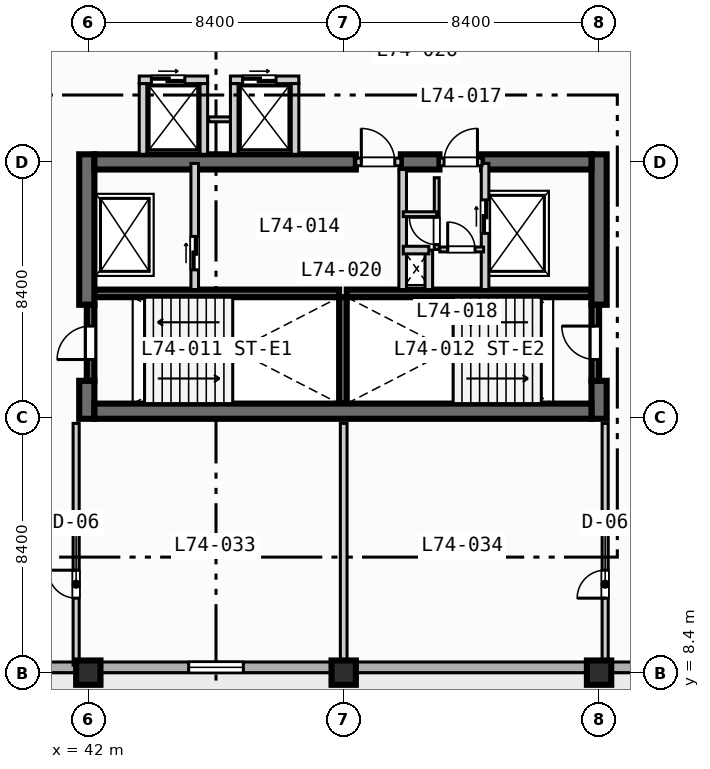
"""IFC4 building model, lengths in metres.
Left out: names, types, materials, properties, quantities, classifications, styles, units other than length and angle.
Written with IfcOpenShell. Run it as: python <this file> out.ifc"""

import sys

from ifc_helpers import new_model, si_unit, direction, frame, frame_2d, origin, origin_2d, place, context, subcontext, project, spatial, rectangle, extrude, element, fill, save


model = new_model("IFC4")
c1 = context("Model", 3, precision=1e-05, world=origin(), true_north=direction((0.0, 1.0)))
c2 = subcontext(c1, "Body", "Model", "MODEL_VIEW")
j1 = project(units=[si_unit("LENGTHUNIT", "METRE"), si_unit("PLANEANGLEUNIT", "RADIAN")], contexts=[c1])
p1 = place(None, origin())
s1 = spatial("IfcSite", under=j1, at=p1, CompositionType="ELEMENT")
p2 = place(p1, origin())
s2 = spatial("IfcBuilding", under=s1, at=p2, CompositionType="ELEMENT")
p3 = place(p2, frame((0.0, 0.0, 300.8)))
s3 = spatial("IfcBuildingStorey", under=s2, at=p3, CompositionType="ELEMENT", Elevation=300.8)
for number, where, z_axis, x_axis in (
    (1, (42.2, 20.875, 0.0), (0.0, 0.0, 1.0), (1.0, 0.0, 0.0)),
    (2, (50.5, 20.875, 0.0), (0.0, 0.0, 1.0), (1.0, 0.0, 0.0)),
):
    element("IfcWall", number, at=place(p3, frame(where, z_axis=z_axis, x_axis=x_axis)), inside=s3, PredefinedType="SOLIDWALL", context=c2, shape_type="SweptSolid", body=[
        extrude(rectangle(XDim=8.05, YDim=0.25, at=frame_2d((4.025, 0.0))), origin(), (0.0, 0.0, 1.0), 3.67),
    ])
p4 = place(p3, frame((50.375, 17.25, 0.0), z_axis=(0.0, 0.0, 1.0), x_axis=(0.0, 1.0, 0.0)))
e3 = element("IfcWall", 3, at=p4, inside=s3, PredefinedType="SOLIDWALL", context=c2, shape_type="SweptSolid", body=[
    extrude(rectangle(XDim=3.5, YDim=0.25, at=frame_2d((1.75, 0.0))), origin(), (0.0, 0.0, 1.0), 3.67),
])
p5 = place(p3, frame((41.95, 16.75, 0.0), z_axis=(0.0, 0.0, 1.0), x_axis=(0.0, 1.0, 0.0)))
e4 = element("IfcWall", 4, at=p5, inside=s3, PredefinedType="SHEAR", context=c2, shape_type="SweptSolid", body=[
    extrude(rectangle(XDim=1.25, YDim=0.5, at=frame_2d((0.625, 0.0))), origin(), (0.0, 0.0, 1.0), 3.67),
])
p6 = place(p3, frame((41.95, 20.5, 0.0), z_axis=(0.0, 0.0, 1.0), x_axis=(0.0, 1.0, 0.0)))
e5 = element("IfcWall", 5, at=p6, inside=s3, PredefinedType="SHEAR", context=c2, shape_type="SweptSolid", body=[
    extrude(rectangle(XDim=4.95, YDim=0.5, at=frame_2d((2.475, 0.0))), origin(), (0.0, 0.0, 1.0), 3.67),
])
p7 = place(p3, frame((58.8, 16.75, 0.0), z_axis=(0.0, 0.0, 1.0), x_axis=(0.0, 1.0, 0.0)))
e6 = element("IfcWall", 6, at=p7, inside=s3, PredefinedType="SHEAR", context=c2, shape_type="SweptSolid", body=[
    extrude(rectangle(XDim=1.25, YDim=0.5, at=frame_2d((0.625, 0.0))), origin(), (0.0, 0.0, 1.0), 3.67),
])
p8 = place(p3, frame((58.8, 20.5, 0.0), z_axis=(0.0, 0.0, 1.0), x_axis=(0.0, 1.0, 0.0)))
e7 = element("IfcWall", 7, at=p8, inside=s3, PredefinedType="SHEAR", context=c2, shape_type="SweptSolid", body=[
    extrude(rectangle(XDim=4.95, YDim=0.5, at=frame_2d((2.475, 0.0))), origin(), (0.0, 0.0, 1.0), 3.67),
])
p9 = place(p3, frame((42.2, 17.0, 0.0), z_axis=(0.0, 0.0, 1.0), x_axis=(1.0, 0.0, 0.0)))
e8 = element("IfcWall", 8, at=p9, inside=s3, PredefinedType="SHEAR", context=c2, shape_type="SweptSolid", body=[
    extrude(rectangle(XDim=16.35, YDim=0.5, at=frame_2d((8.175, 0.0))), origin(), (0.0, 0.0, 1.0), 3.67),
])
p10 = place(p3, frame((42.2, 25.2, 0.0), z_axis=(0.0, 0.0, 1.0), x_axis=(1.0, 0.0, 0.0)))
e9 = element("IfcWall", 9, at=p10, inside=s3, PredefinedType="SHEAR", context=c2, shape_type="SweptSolid", body=[
    extrude(rectangle(XDim=8.6, YDim=0.5, at=frame_2d((4.3, 0.0))), origin(), (0.0, 0.0, 1.0), 3.67),
])
p11 = place(p3, frame((52.28, 25.2, 0.0), z_axis=(0.0, 0.0, 1.0), x_axis=(1.0, 0.0, 0.0)))
e10 = element("IfcWall", 10, at=p11, inside=s3, PredefinedType="SHEAR", context=c2, shape_type="SweptSolid", body=[
    extrude(rectangle(XDim=1.27, YDim=0.5, at=frame_2d((0.635, 0.0))), origin(), (0.0, 0.0, 1.0), 3.67),
])
p12 = place(p3, frame((54.95, 25.2, 0.0), z_axis=(0.0, 0.0, 1.0), x_axis=(1.0, 0.0, 0.0)))
e11 = element("IfcWall", 11, at=p12, inside=s3, PredefinedType="SHEAR", context=c2, shape_type="SweptSolid", body=[
    extrude(rectangle(XDim=3.6, YDim=0.5, at=frame_2d((1.8, 0.0))), origin(), (0.0, 0.0, 1.0), 3.67),
])
for number, where, z_axis, x_axis in (
    (12, (42.0, 8.4, 0.0), (0.0, 0.0, 1.0), (1.0, 0.0, 0.0)),
    (13, (50.4, 8.4, 0.0), (0.0, 0.0, 1.0), (1.0, 0.0, 0.0)),
    (14, (58.8, 8.4, 0.0), (0.0, 0.0, 1.0), (1.0, 0.0, 0.0)),
):
    element("IfcColumn", number, at=place(p3, frame(where, z_axis=z_axis, x_axis=x_axis)), inside=s3, PredefinedType="COLUMN", context=c2, shape_type="SweptSolid", body=[
        extrude(rectangle(XDim=0.8, YDim=0.8, at=origin_2d()), origin(), (0.0, 0.0, 1.0), 3.9),
    ])
p13 = place(p3, frame((64.025, 8.575, 0.0), z_axis=(0.0, 0.0, 1.0), x_axis=(-1.0, 0.0, 0.0)))
e15 = element("IfcWall", 15, at=p13, inside=s3, PredefinedType="STANDARD", context=c2, shape_type="SweptSolid", body=[
    extrude(rectangle(XDim=52.45, YDim=0.35, at=frame_2d((26.225, 0.0))), origin(), (0.0, 0.0, 1.0), 3.67),
])
p14 = place(p13, frame((34.925, 0.0, 0.0)))
e16 = element("IfcOpeningElement", 16, at=p14, cuts=e15, PredefinedType="OPENING", context=c2, shape_type="SweptSolid", body=[
    extrude(rectangle(XDim=1.4, YDim=2.2, at=frame_2d((0.7, 1.1))), frame((0.0, 0.185, 0.0), z_axis=(0.0, -1.0, 0.0), x_axis=(1.0, 0.0, 0.0)), (0.0, 0.0, 1.0), 0.37),
])
p15 = place(p13, frame((25.025, 0.0, 0.85)))
e17 = element("IfcOpeningElement", 17, at=p15, cuts=e15, PredefinedType="OPENING", context=c2, shape_type="SweptSolid", body=[
    extrude(rectangle(XDim=2.4, YDim=1.95, at=frame_2d((1.2, 0.975))), frame((0.0, 0.185, 0.0), z_axis=(0.0, -1.0, 0.0), x_axis=(1.0, 0.0, 0.0)), (0.0, 0.0, 1.0), 0.37),
])
p16 = place(p13, frame((16.925, 0.0, 0.85)))
e18 = element("IfcOpeningElement", 18, at=p16, cuts=e15, PredefinedType="OPENING", context=c2, shape_type="SweptSolid", body=[
    extrude(rectangle(XDim=1.8, YDim=1.8, at=frame_2d((0.9, 0.9))), frame((0.0, 0.185, 0.0), z_axis=(0.0, -1.0, 0.0), x_axis=(1.0, 0.0, 0.0)), (0.0, 0.0, 1.0), 0.37),
])
p17 = place(p13, frame((47.925, 0.0, 0.85)))
e19 = element("IfcOpeningElement", 19, at=p17, cuts=e15, PredefinedType="OPENING", context=c2, shape_type="SweptSolid", body=[
    extrude(rectangle(XDim=1.8, YDim=1.8, at=frame_2d((0.9, 0.9))), frame((0.0, 0.185, 0.0), z_axis=(0.0, -1.0, 0.0), x_axis=(1.0, 0.0, 0.0)), (0.0, 0.0, 1.0), 0.37),
])
p18 = place(p3, frame((42.075, 18.0, 0.0), z_axis=(0.0, 0.0, 1.0), x_axis=(0.0, 1.0, 0.0)))
e20 = element("IfcWall", 20, at=p18, inside=s3, PredefinedType="SOLIDWALL", context=c2, shape_type="SweptSolid", body=[
    extrude(rectangle(XDim=2.5, YDim=0.25, at=frame_2d((1.25, 0.0))), origin(), (0.0, 0.0, 1.0), 3.67),
])
p19 = place(p18, frame((0.7, 0.0, 0.0)))
e21 = element("IfcOpeningElement", 21, at=p19, cuts=e20, PredefinedType="OPENING", context=c2, shape_type="SweptSolid", body=[
    extrude(rectangle(XDim=1.1, YDim=2.15, at=frame_2d((0.55, 1.075))), frame((0.0, 0.135, 0.0), z_axis=(0.0, -1.0, 0.0), x_axis=(1.0, 0.0, 0.0)), (0.0, 0.0, 1.0), 0.27),
])
p20 = place(p3, frame((58.675, 18.0, 0.0), z_axis=(0.0, 0.0, 1.0), x_axis=(0.0, 1.0, 0.0)))
e22 = element("IfcWall", 22, at=p20, inside=s3, PredefinedType="SOLIDWALL", context=c2, shape_type="SweptSolid", body=[
    extrude(rectangle(XDim=2.5, YDim=0.25, at=frame_2d((1.25, 0.0))), origin(), (0.0, 0.0, 1.0), 3.67),
])
p21 = place(p20, frame((0.7, 0.0, 0.0)))
e23 = element("IfcOpeningElement", 23, at=p21, cuts=e22, PredefinedType="OPENING", context=c2, shape_type="SweptSolid", body=[
    extrude(rectangle(XDim=1.1, YDim=2.15, at=frame_2d((0.55, 1.075))), frame((0.0, 0.135, 0.0), z_axis=(0.0, -1.0, 0.0), x_axis=(1.0, 0.0, 0.0)), (0.0, 0.0, 1.0), 0.27),
])
p22 = place(p3, frame((45.5, 21.0, 0.0), z_axis=(0.0, 0.0, 1.0), x_axis=(0.0, 1.0, 0.0)))
e24 = element("IfcWall", 24, at=p22, inside=s3, PredefinedType="SOLIDWALL", context=c2, shape_type="SweptSolid", body=[
    extrude(rectangle(XDim=4.15, YDim=0.25, at=frame_2d((2.075, 0.0))), origin(), (0.0, 0.0, 1.0), 3.67),
])
p23 = place(p22, frame((0.65, 0.0, 0.0)))
e25 = element("IfcOpeningElement", 25, at=p23, cuts=e24, PredefinedType="OPENING", context=c2, shape_type="SweptSolid", body=[
    extrude(rectangle(XDim=1.1, YDim=2.15, at=frame_2d((0.55, 1.075))), frame((0.0, 0.135, 0.0), z_axis=(0.0, -1.0, 0.0), x_axis=(1.0, 0.0, 0.0)), (0.0, 0.0, 1.0), 0.27),
])
p24 = place(p3, frame((50.8, 25.2, 0.0), z_axis=(0.0, 0.0, 1.0), x_axis=(1.0, 0.0, 0.0)))
e26 = element("IfcWall", 26, at=p24, inside=s3, PredefinedType="SOLIDWALL", context=c2, shape_type="SweptSolid", body=[
    extrude(rectangle(XDim=1.48, YDim=0.25, at=frame_2d((0.74, 0.0))), origin(), (0.0, 0.0, 1.0), 3.67),
])
p25 = place(p24, frame((0.18, 0.0, 0.0)))
e27 = element("IfcOpeningElement", 27, at=p25, cuts=e26, PredefinedType="OPENING", context=c2, shape_type="SweptSolid", body=[
    extrude(rectangle(XDim=1.1, YDim=2.15, at=frame_2d((0.55, 1.075))), frame((0.0, 0.135, 0.0), z_axis=(0.0, -1.0, 0.0), x_axis=(1.0, 0.0, 0.0)), (0.0, 0.0, 1.0), 0.27),
])
p26 = place(p3, frame((52.34, 21.0, 0.0), z_axis=(0.0, 0.0, 1.0), x_axis=(0.0, 1.0, 0.0)))
e28 = element("IfcWall", 28, at=p26, inside=s3, PredefinedType="SOLIDWALL", context=c2, shape_type="SweptSolid", body=[
    extrude(rectangle(XDim=3.95, YDim=0.25, at=frame_2d((1.975, 0.0))), origin(), (0.0, 0.0, 1.0), 3.67),
])
p27 = place(p3, frame((55.05, 21.0, 0.0), z_axis=(0.0, 0.0, 1.0), x_axis=(0.0, 1.0, 0.0)))
e29 = element("IfcWall", 29, at=p27, inside=s3, PredefinedType="SOLIDWALL", context=c2, shape_type="SweptSolid", body=[
    extrude(rectangle(XDim=4.15, YDim=0.25, at=frame_2d((2.075, 0.0))), origin(), (0.0, 0.0, 1.0), 3.67),
])
p28 = place(p27, frame((1.85, 0.0, 0.0)))
e30 = element("IfcOpeningElement", 30, at=p28, cuts=e29, PredefinedType="OPENING", context=c2, shape_type="SweptSolid", body=[
    extrude(rectangle(XDim=1.1, YDim=2.15, at=frame_2d((0.55, 1.075))), frame((0.0, 0.135, 0.0), z_axis=(0.0, -1.0, 0.0), x_axis=(1.0, 0.0, 0.0)), (0.0, 0.0, 1.0), 0.27),
])
p29 = place(p3, frame((53.55, 25.2, 0.0), z_axis=(0.0, 0.0, 1.0), x_axis=(1.0, 0.0, 0.0)))
e31 = element("IfcWall", 31, at=p29, inside=s3, PredefinedType="SOLIDWALL", context=c2, shape_type="SweptSolid", body=[
    extrude(rectangle(XDim=1.4, YDim=0.25, at=frame_2d((0.7, 0.0))), origin(), (0.0, 0.0, 1.0), 3.67),
])
p30 = place(p29, frame((0.15, 0.0, 0.0)))
e32 = element("IfcOpeningElement", 32, at=p30, cuts=e31, PredefinedType="OPENING", context=c2, shape_type="SweptSolid", body=[
    extrude(rectangle(XDim=1.1, YDim=2.15, at=frame_2d((0.55, 1.075))), frame((0.0, 0.135, 0.0), z_axis=(0.0, -1.0, 0.0), x_axis=(1.0, 0.0, 0.0)), (0.0, 0.0, 1.0), 0.27),
])
p31 = place(p3, frame((53.2, 21.0, 0.0), z_axis=(0.0, 0.0, 1.0), x_axis=(0.0, 1.0, 0.0)))
e33 = element("IfcWall", 33, at=p31, inside=s3, PredefinedType="SOLIDWALL", context=c2, shape_type="SweptSolid", body=[
    extrude(rectangle(XDim=1.3, YDim=0.25, at=frame_2d((0.65, 0.0))), origin(), (0.0, 0.0, 1.0), 3.67),
])
p32 = place(p3, frame((52.36, 22.3, 0.0), z_axis=(0.0, 0.0, 1.0), x_axis=(1.0, 0.0, 0.0)))
e34 = element("IfcWall", 34, at=p32, inside=s3, PredefinedType="SOLIDWALL", context=c2, shape_type="SweptSolid", body=[
    extrude(rectangle(XDim=0.84, YDim=0.25, at=frame_2d((0.42, 0.0))), origin(), (0.0, 0.0, 1.0), 3.67),
])
p33 = place(p3, frame((53.56, 22.32, 0.0), z_axis=(0.0, 0.0, 1.0), x_axis=(1.0, 0.0, 0.0)))
e35 = element("IfcWall", 35, at=p33, inside=s3, PredefinedType="PARTITIONING", context=c2, shape_type="SweptSolid", body=[
    extrude(rectangle(XDim=1.44, YDim=0.16, at=frame_2d((0.72, 0.0))), origin(), (0.0, 0.0, 1.0), 3.67),
])
p34 = place(p33, frame((0.26, 0.0, 0.0)))
e36 = element("IfcOpeningElement", 36, at=p34, cuts=e35, PredefinedType="OPENING", context=c2, shape_type="SweptSolid", body=[
    extrude(rectangle(XDim=0.9, YDim=2.1, at=frame_2d((0.45, 1.05))), frame((0.0, 0.09, 0.0), z_axis=(0.0, -1.0, 0.0), x_axis=(1.0, 0.0, 0.0)), (0.0, 0.0, 1.0), 0.18),
])
p35 = place(p3, frame((53.46, 22.32, 0.0), z_axis=(0.0, 0.0, 1.0), x_axis=(0.0, 1.0, 0.0)))
e37 = element("IfcWall", 37, at=p35, inside=s3, PredefinedType="PARTITIONING", context=c2, shape_type="SweptSolid", body=[
    extrude(rectangle(XDim=2.36, YDim=0.16, at=frame_2d((1.18, 0.0))), origin(), (0.0, 0.0, 1.0), 3.67),
])
p36 = place(p35, frame((0.16, 0.0, 0.0)))
e38 = element("IfcOpeningElement", 38, at=p36, cuts=e37, PredefinedType="OPENING", context=c2, shape_type="SweptSolid", body=[
    extrude(rectangle(XDim=0.9, YDim=2.1, at=frame_2d((0.45, 1.05))), frame((0.0, 0.09, 0.0), z_axis=(0.0, -1.0, 0.0), x_axis=(1.0, 0.0, 0.0)), (0.0, 0.0, 1.0), 0.18),
])
p37 = place(p3, frame((52.36, 23.48, 0.0), z_axis=(0.0, 0.0, 1.0), x_axis=(1.0, 0.0, 0.0)))
e39 = element("IfcWall", 39, at=p37, inside=s3, PredefinedType="PARTITIONING", context=c2, shape_type="SweptSolid", body=[
    extrude(rectangle(XDim=1.1, YDim=0.16, at=frame_2d((0.55, 0.0))), origin(), (0.0, 0.0, 1.0), 3.67),
])
p38 = place(p3, frame((43.675, 27.9, 0.0), z_axis=(0.0, 0.0, 1.0), x_axis=(1.0, 0.0, 0.0)))
e40 = element("IfcWall", 40, at=p38, inside=s3, PredefinedType="SOLIDWALL", context=c2, shape_type="SweptSolid", body=[
    extrude(rectangle(XDim=2.25, YDim=0.25, at=frame_2d((1.125, 0.0))), origin(), (0.0, 0.0, 1.0), 3.67),
])
p39 = place(p38, frame((0.4, 0.0, 0.0)))
e41 = element("IfcOpeningElement", 41, at=p39, cuts=e40, PredefinedType="OPENING", context=c2, shape_type="SweptSolid", body=[
    extrude(rectangle(XDim=1.1, YDim=2.15, at=frame_2d((0.55, 1.075))), frame((0.0, 0.135, 0.0), z_axis=(0.0, -1.0, 0.0), x_axis=(1.0, 0.0, 0.0)), (0.0, 0.0, 1.0), 0.27),
])
for number, where, z_axis, x_axis in (
    (42, (43.8, 25.45, 0.0), (0.0, 0.0, 1.0), (0.0, 1.0, 0.0)),
    (43, (45.8, 25.45, 0.0), (0.0, 0.0, 1.0), (0.0, 1.0, 0.0)),
):
    element("IfcWall", number, at=place(p3, frame(where, z_axis=z_axis, x_axis=x_axis)), inside=s3, PredefinedType="SOLIDWALL", context=c2, shape_type="SweptSolid", body=[
        extrude(rectangle(XDim=2.325, YDim=0.25, at=frame_2d((1.163, 0.0))), origin(), (0.0, 0.0, 1.0), 3.67),
    ])
p40 = place(p3, frame((45.96, 26.6, 0.0), z_axis=(0.0, 0.0, 1.0), x_axis=(1.0, 0.0, 0.0)))
e44 = element("IfcWall", 44, at=p40, inside=s3, PredefinedType="PARTITIONING", context=c2, shape_type="SweptSolid", body=[
    extrude(rectangle(XDim=0.88, YDim=0.16, at=frame_2d((0.44, 0.0))), origin(), (0.0, 0.0, 1.0), 3.67),
])
p41 = place(p3, frame((46.675, 27.9, 0.0), z_axis=(0.0, 0.0, 1.0), x_axis=(1.0, 0.0, 0.0)))
e45 = element("IfcWall", 45, at=p41, inside=s3, PredefinedType="SOLIDWALL", context=c2, shape_type="SweptSolid", body=[
    extrude(rectangle(XDim=2.25, YDim=0.25, at=frame_2d((1.125, 0.0))), origin(), (0.0, 0.0, 1.0), 3.67),
])
p42 = place(p41, frame((0.4, 0.0, 0.0)))
e46 = element("IfcOpeningElement", 46, at=p42, cuts=e45, PredefinedType="OPENING", context=c2, shape_type="SweptSolid", body=[
    extrude(rectangle(XDim=1.1, YDim=2.15, at=frame_2d((0.55, 1.075))), frame((0.0, 0.135, 0.0), z_axis=(0.0, -1.0, 0.0), x_axis=(1.0, 0.0, 0.0)), (0.0, 0.0, 1.0), 0.27),
])
for number, where, z_axis, x_axis in (
    (47, (46.8, 25.45, 0.0), (0.0, 0.0, 1.0), (0.0, 1.0, 0.0)),
    (48, (48.8, 25.45, 0.0), (0.0, 0.0, 1.0), (0.0, 1.0, 0.0)),
):
    element("IfcWall", number, at=place(p3, frame(where, z_axis=z_axis, x_axis=x_axis)), inside=s3, PredefinedType="SOLIDWALL", context=c2, shape_type="SweptSolid", body=[
        extrude(rectangle(XDim=2.325, YDim=0.25, at=frame_2d((1.163, 0.0))), origin(), (0.0, 0.0, 1.0), 3.67),
    ])
p43 = place(p3, frame((41.6, 8.65, 0.0), z_axis=(0.0, 0.0, 1.0), x_axis=(0.0, 1.0, 0.0)))
e49 = element("IfcWall", 49, at=p43, inside=s3, PredefinedType="PARTITIONING", context=c2, shape_type="SweptSolid", body=[
    extrude(rectangle(XDim=7.95, YDim=0.2, at=frame_2d((3.975, 0.0))), origin(), (0.0, 0.0, 1.0), 3.67),
])
p44 = place(p43, frame((2.2, 0.0, 0.0)))
e50 = element("IfcOpeningElement", 50, at=p44, cuts=e49, PredefinedType="OPENING", context=c2, shape_type="SweptSolid", body=[
    extrude(rectangle(XDim=0.92, YDim=2.1, at=frame_2d((0.46, 1.05))), frame((0.0, 0.11, 0.0), z_axis=(0.0, -1.0, 0.0), x_axis=(1.0, 0.0, 0.0)), (0.0, 0.0, 1.0), 0.22),
])
p45 = place(p3, frame((59.0, 8.65, 0.0), z_axis=(0.0, 0.0, 1.0), x_axis=(0.0, 1.0, 0.0)))
e51 = element("IfcWall", 51, at=p45, inside=s3, PredefinedType="PARTITIONING", context=c2, shape_type="SweptSolid", body=[
    extrude(rectangle(XDim=7.95, YDim=0.2, at=frame_2d((3.975, 0.0))), origin(), (0.0, 0.0, 1.0), 3.059),
])
p46 = place(p45, frame((2.2, 0.0, 0.0)))
e52 = element("IfcOpeningElement", 52, at=p46, cuts=e51, PredefinedType="OPENING", context=c2, shape_type="SweptSolid", body=[
    extrude(rectangle(XDim=0.92, YDim=2.1, at=frame_2d((0.46, 1.05))), frame((0.0, 0.11, 0.0), z_axis=(0.0, -1.0, 0.0), x_axis=(1.0, 0.0, 0.0)), (0.0, 0.0, 1.0), 0.22),
])
p47 = place(p3, frame((50.4, 8.65, 0.0), z_axis=(0.0, 0.0, 1.0), x_axis=(0.0, 1.0, 0.0)))
e53 = element("IfcWall", 53, at=p47, inside=s3, PredefinedType="PARTITIONING", context=c2, shape_type="SweptSolid", body=[
    extrude(rectangle(XDim=7.95, YDim=0.22, at=frame_2d((3.975, 0.0))), origin(), (0.0, 0.0, 1.0), 3.07),
])
p48 = place(p16, origin())
e54 = element("IfcWindow", 54, at=p48, inside=s3, PartitioningType="SINGLE_PANEL", PredefinedType="WINDOW", context=c2, shape_type="SweptSolid", body=[
    extrude(rectangle(XDim=1.8, YDim=1.8, at=frame_2d((0.9, 0.9))), frame((0.0, 0.03, 0.0), z_axis=(0.0, -1.0, 0.0), x_axis=(1.0, 0.0, 0.0)), (0.0, 0.0, 1.0), 0.06),
])
fill(e18, e54)
p49 = place(p19, origin())
e55 = element("IfcDoor", 55, at=p49, inside=s3, OperationType="SINGLE_SWING_LEFT", PredefinedType="DOOR", context=c2, shape_type="SweptSolid", body=[
    extrude(rectangle(XDim=1.1, YDim=2.15, at=frame_2d((0.55, 1.075))), frame((0.0, 0.025, 0.0), z_axis=(0.0, -1.0, 0.0), x_axis=(1.0, 0.0, 0.0)), (0.0, 0.0, 1.0), 0.05),
])
fill(e21, e55)
p50 = place(p21, origin())
e56 = element("IfcDoor", 56, at=p50, inside=s3, OperationType="SINGLE_SWING_RIGHT", PredefinedType="DOOR", context=c2, shape_type="SweptSolid", body=[
    extrude(rectangle(XDim=1.1, YDim=2.15, at=frame_2d((0.55, 1.075))), frame((0.0, 0.025, 0.0), z_axis=(0.0, -1.0, 0.0), x_axis=(1.0, 0.0, 0.0)), (0.0, 0.0, 1.0), 0.05),
])
fill(e23, e56)
p51 = place(p23, origin())
e57 = element("IfcDoor", 57, at=p51, inside=s3, OperationType="SLIDING_TO_LEFT", PredefinedType="DOOR", context=c2, shape_type="SweptSolid", body=[
    extrude(rectangle(XDim=1.1, YDim=2.15, at=frame_2d((0.55, 1.075))), frame((0.0, 0.025, 0.0), z_axis=(0.0, -1.0, 0.0), x_axis=(1.0, 0.0, 0.0)), (0.0, 0.0, 1.0), 0.05),
])
fill(e25, e57)
p52 = place(p25, origin())
e58 = element("IfcDoor", 58, at=p52, inside=s3, OperationType="SINGLE_SWING_LEFT", PredefinedType="DOOR", context=c2, shape_type="SweptSolid", body=[
    extrude(rectangle(XDim=1.1, YDim=2.15, at=frame_2d((0.55, 1.075))), frame((0.0, 0.025, 0.0), z_axis=(0.0, -1.0, 0.0), x_axis=(1.0, 0.0, 0.0)), (0.0, 0.0, 1.0), 0.05),
])
fill(e27, e58)
p53 = place(p28, origin())
e59 = element("IfcDoor", 59, at=p53, inside=s3, OperationType="SLIDING_TO_LEFT", PredefinedType="DOOR", context=c2, shape_type="SweptSolid", body=[
    extrude(rectangle(XDim=1.1, YDim=2.15, at=frame_2d((0.55, 1.075))), frame((0.0, 0.025, 0.0), z_axis=(0.0, -1.0, 0.0), x_axis=(1.0, 0.0, 0.0)), (0.0, 0.0, 1.0), 0.05),
])
fill(e30, e59)
p54 = place(p30, origin())
e60 = element("IfcDoor", 60, at=p54, inside=s3, OperationType="SINGLE_SWING_RIGHT", PredefinedType="DOOR", context=c2, shape_type="SweptSolid", body=[
    extrude(rectangle(XDim=1.1, YDim=2.15, at=frame_2d((0.55, 1.075))), frame((0.0, 0.025, 0.0), z_axis=(0.0, -1.0, 0.0), x_axis=(1.0, 0.0, 0.0)), (0.0, 0.0, 1.0), 0.05),
])
fill(e32, e60)
p55 = place(p34, origin())
e61 = element("IfcDoor", 61, at=p55, inside=s3, OperationType="SINGLE_SWING_LEFT", PredefinedType="DOOR", context=c2, shape_type="SweptSolid", body=[
    extrude(rectangle(XDim=0.9, YDim=2.1, at=frame_2d((0.45, 1.05))), frame((0.0, 0.025, 0.0), z_axis=(0.0, -1.0, 0.0), x_axis=(1.0, 0.0, 0.0)), (0.0, 0.0, 1.0), 0.05),
])
fill(e36, e61)
p56 = place(p36, origin())
e62 = element("IfcDoor", 62, at=p56, inside=s3, OperationType="SINGLE_SWING_RIGHT", PredefinedType="DOOR", context=c2, shape_type="SweptSolid", body=[
    extrude(rectangle(XDim=0.9, YDim=2.1, at=frame_2d((0.45, 1.05))), frame((0.0, 0.025, 0.0), z_axis=(0.0, -1.0, 0.0), x_axis=(1.0, 0.0, 0.0)), (0.0, 0.0, 1.0), 0.05),
])
fill(e38, e62)
p57 = place(p39, origin())
e63 = element("IfcDoor", 63, at=p57, inside=s3, OperationType="SLIDING_TO_LEFT", PredefinedType="DOOR", context=c2, shape_type="SweptSolid", body=[
    extrude(rectangle(XDim=1.1, YDim=2.15, at=frame_2d((0.55, 1.075))), frame((0.0, 0.025, 0.0), z_axis=(0.0, -1.0, 0.0), x_axis=(1.0, 0.0, 0.0)), (0.0, 0.0, 1.0), 0.05),
])
fill(e41, e63)
p58 = place(p42, origin())
e64 = element("IfcDoor", 64, at=p58, inside=s3, OperationType="SLIDING_TO_LEFT", PredefinedType="DOOR", context=c2, shape_type="SweptSolid", body=[
    extrude(rectangle(XDim=1.1, YDim=2.15, at=frame_2d((0.55, 1.075))), frame((0.0, 0.025, 0.0), z_axis=(0.0, -1.0, 0.0), x_axis=(1.0, 0.0, 0.0)), (0.0, 0.0, 1.0), 0.05),
])
fill(e46, e64)
p59 = place(p44, origin())
e65 = element("IfcDoor", 65, at=p59, inside=s3, OperationType="SINGLE_SWING_RIGHT", PredefinedType="DOOR", context=c2, shape_type="SweptSolid", body=[
    extrude(rectangle(XDim=0.92, YDim=2.1, at=frame_2d((0.46, 1.05))), frame((0.0, 0.025, 0.0), z_axis=(0.0, -1.0, 0.0), x_axis=(1.0, 0.0, 0.0)), (0.0, 0.0, 1.0), 0.05),
])
fill(e50, e65)
p60 = place(p46, origin())
e66 = element("IfcDoor", 66, at=p60, inside=s3, OperationType="SINGLE_SWING_LEFT", PredefinedType="DOOR", context=c2, shape_type="SweptSolid", body=[
    extrude(rectangle(XDim=0.92, YDim=2.1, at=frame_2d((0.46, 1.05))), frame((0.0, 0.025, 0.0), z_axis=(0.0, -1.0, 0.0), x_axis=(1.0, 0.0, 0.0)), (0.0, 0.0, 1.0), 0.05),
])
fill(e52, e66)
save(model, sys.argv[1])
